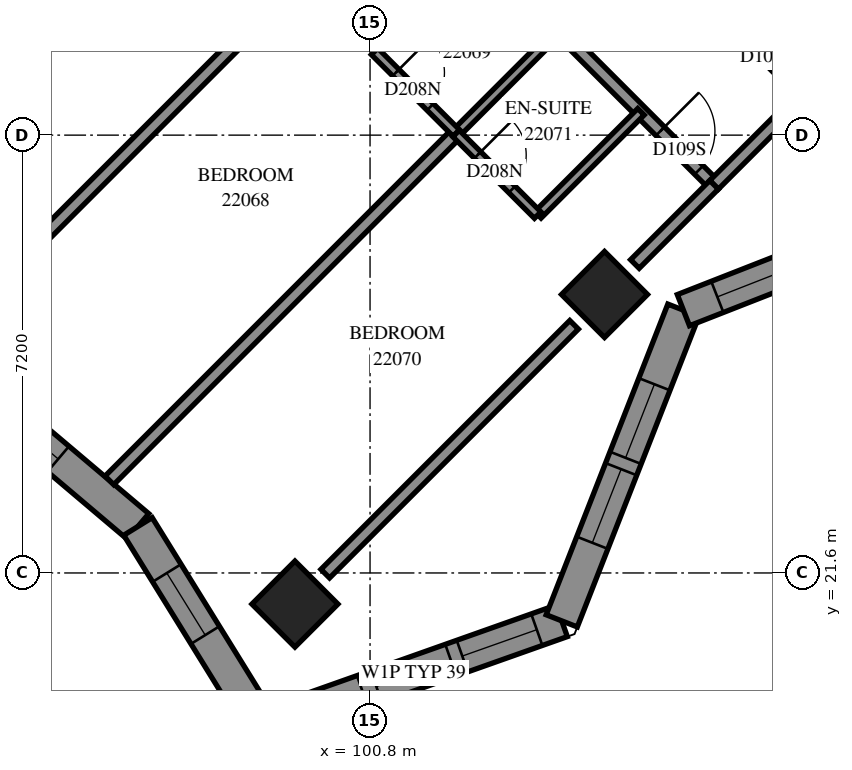
"""IFC4 building model, lengths in metres.
Left out: names, types, materials, properties, quantities, classifications, styles, units other than length and angle.
Written with IfcOpenShell. Run it as: python <this file> out.ifc"""

import sys

from ifc_helpers import new_model, si_unit, direction, frame, frame_2d, origin, origin_2d, place, context, subcontext, project, spatial, polyline, rectangle, outline, extrude, element, fill, save


model = new_model("IFC4")
c1 = context("Model", 3, precision=1e-05, world=origin(), true_north=direction((0.0, 1.0)))
c2 = subcontext(c1, "Body", "Model", "MODEL_VIEW")
j1 = project(units=[si_unit("LENGTHUNIT", "METRE"), si_unit("PLANEANGLEUNIT", "RADIAN")], contexts=[c1])
p1 = place(None, origin())
s1 = spatial("IfcSite", under=j1, at=p1, CompositionType="ELEMENT")
p2 = place(p1, origin())
s2 = spatial("IfcBuilding", under=s1, at=p2, CompositionType="ELEMENT")
p3 = place(p2, frame((0.0, 0.0, 84.6)))
s3 = spatial("IfcBuildingStorey", under=s2, at=p3, CompositionType="ELEMENT", Elevation=84.6)
for number, where, z_axis, x_axis in (
    (1, (104.656, 26.18, 0.0), (0.0, 0.0, 1.0), (0.707, -0.707, 0.0)),
    (2, (99.565, 21.088, 0.0), (0.0, 0.0, 1.0), (0.707, -0.707, 0.0)),
):
    element("IfcColumn", number, at=place(p3, frame(where, z_axis=z_axis, x_axis=x_axis)), inside=s3, PredefinedType="COLUMN", context=c2, shape_type="SweptSolid", body=[
        extrude(rectangle(XDim=1.0, YDim=1.0, at=origin_2d()), origin(), (0.0, 0.0, 1.0), 3.1),
    ])
p4 = place(p3, frame((99.024, 19.067, 0.0), z_axis=(0.0, 0.0, 1.0), x_axis=(0.9426193246, 0.3338694489, 0.0)))
e3 = element("IfcWall", 3, at=p4, inside=s3, PredefinedType="SOLIDWALL", context=c2, shape_type="SweptSolid", body=[
    extrude(outline(polyline([(-0.222, -0.275), (5.354, -0.275), (5.103, 0.275), (0.222, 0.275), (-0.222, -0.275)])), origin(), (0.0, 0.0, 1.0), 3.1),
])
p5 = place(p4, frame((1.993, 0.0, 0.5)))
e4 = element("IfcOpeningElement", 4, at=p5, cuts=e3, PredefinedType="OPENING", context=c2, shape_type="SweptSolid", body=[
    extrude(rectangle(XDim=1.3, YDim=2.45, at=frame_2d((0.65, 1.225))), frame((0.0, 0.285, 0.0), z_axis=(0.0, -1.0, 0.0), x_axis=(1.0, 0.0, 0.0)), (0.0, 0.0, 1.0), 0.57),
])
p6 = place(p4, frame((3.493, 0.0, 0.5)))
e5 = element("IfcOpeningElement", 5, at=p6, cuts=e3, PredefinedType="OPENING", context=c2, shape_type="SweptSolid", body=[
    extrude(rectangle(XDim=1.3, YDim=2.45, at=frame_2d((0.65, 1.225))), frame((0.0, 0.285, 0.0), z_axis=(0.0, -1.0, 0.0), x_axis=(1.0, 0.0, 0.0)), (0.0, 0.0, 1.0), 0.57),
])
p7 = place(p4, frame((0.553, 0.0, 0.5)))
e6 = element("IfcOpeningElement", 6, at=p7, cuts=e3, PredefinedType="OPENING", context=c2, shape_type="SweptSolid", body=[
    extrude(rectangle(XDim=1.2, YDim=2.45, at=frame_2d((0.6, 1.225))), frame((0.0, 0.285, 0.0), z_axis=(0.0, -1.0, 0.0), x_axis=(1.0, 0.0, 0.0)), (0.0, 0.0, 1.0), 0.57),
])
p8 = place(p3, frame((103.952, 20.812, 0.0), z_axis=(0.0, 0.0, 1.0), x_axis=(0.3646659578, 0.9311384103, 0.0)))
e7 = element("IfcWall", 7, at=p8, inside=s3, PredefinedType="SOLIDWALL", context=c2, shape_type="SweptSolid", body=[
    extrude(outline(polyline([(-0.126, -0.275), (5.367, -0.275), (5.607, 0.275), (0.126, 0.275), (-0.126, -0.275)])), origin(), (0.0, 0.0, 1.0), 3.1),
])
p9 = place(p8, frame((1.379, 0.0, 0.5)))
e8 = element("IfcOpeningElement", 8, at=p9, cuts=e7, PredefinedType="OPENING", context=c2, shape_type="SweptSolid", body=[
    extrude(rectangle(XDim=1.3, YDim=2.45, at=frame_2d((0.65, 1.225))), frame((0.0, 0.285, 0.0), z_axis=(0.0, -1.0, 0.0), x_axis=(1.0, 0.0, 0.0)), (0.0, 0.0, 1.0), 0.57),
])
p10 = place(p8, frame((2.879, 0.0, 0.5)))
e9 = element("IfcOpeningElement", 9, at=p10, cuts=e7, PredefinedType="OPENING", context=c2, shape_type="SweptSolid", body=[
    extrude(rectangle(XDim=1.3, YDim=2.45, at=frame_2d((0.65, 1.225))), frame((0.0, 0.285, 0.0), z_axis=(0.0, -1.0, 0.0), x_axis=(1.0, 0.0, 0.0)), (0.0, 0.0, 1.0), 0.57),
])
p11 = place(p3, frame((105.953, 25.922, 0.0), z_axis=(0.0, 0.0, 1.0), x_axis=(0.9311384103, 0.3646659578, 0.0)))
e10 = element("IfcWall", 10, at=p11, inside=s3, PredefinedType="SOLIDWALL", context=c2, shape_type="SweptSolid", body=[
    extrude(outline(polyline([(0.12, -0.275), (5.613, -0.275), (5.361, 0.275), (-0.12, 0.275), (0.12, -0.275)])), origin(), (0.0, 0.0, 1.0), 3.1),
])
p12 = place(p11, frame((0.599, 0.0, 0.5)))
e11 = element("IfcOpeningElement", 11, at=p12, cuts=e10, PredefinedType="OPENING", context=c2, shape_type="SweptSolid", body=[
    extrude(rectangle(XDim=1.2, YDim=2.45, at=frame_2d((0.6, 1.225))), frame((0.0, 0.285, 0.0), z_axis=(0.0, -1.0, 0.0), x_axis=(1.0, 0.0, 0.0)), (0.0, 0.0, 1.0), 0.57),
])
p13 = place(p11, frame((3.08, 0.0, 0.5)))
e12 = element("IfcOpeningElement", 12, at=p13, cuts=e10, PredefinedType="OPENING", context=c2, shape_type="SweptSolid", body=[
    extrude(rectangle(XDim=1.2, YDim=2.45, at=frame_2d((0.6, 1.225))), frame((0.0, 0.285, 0.0), z_axis=(0.0, -1.0, 0.0), x_axis=(1.0, 0.0, 0.0)), (0.0, 0.0, 1.0), 0.57),
])
p14 = place(p3, frame((93.942, 24.937, 0.0), z_axis=(0.0, 0.0, 1.0), x_axis=(0.7635272124, -0.6457756545, 0.0)))
e13 = element("IfcWall", 13, at=p14, inside=s3, PredefinedType="SOLIDWALL", context=c2, shape_type="SweptSolid", body=[
    extrude(outline(polyline([(-0.023, -0.275), (3.939, -0.275), (4.027, 0.275), (0.023, 0.275), (-0.023, -0.275)])), origin(), (0.0, 0.0, 1.0), 3.1),
])
p15 = place(p14, frame((1.065, 0.0, 0.5)))
e14 = element("IfcOpeningElement", 14, at=p15, cuts=e13, PredefinedType="OPENING", context=c2, shape_type="SweptSolid", body=[
    extrude(rectangle(XDim=1.2, YDim=2.45, at=frame_2d((0.6, 1.225))), frame((0.0, 0.285, 0.0), z_axis=(0.0, -1.0, 0.0), x_axis=(1.0, 0.0, 0.0)), (0.0, 0.0, 1.0), 0.57),
])
p16 = place(p3, frame((96.984, 22.365, 0.0), z_axis=(0.0, 0.0, 1.0), x_axis=(0.5261788565, -0.8503739242, 0.0)))
e15 = element("IfcWall", 15, at=p16, inside=s3, PredefinedType="SOLIDWALL", context=c2, shape_type="SweptSolid", body=[
    extrude(outline(polyline([(0.044, -0.275), (4.1, -0.275), (3.657, 0.275), (-0.044, 0.275), (0.044, -0.275)])), origin(), (0.0, 0.0, 1.0), 3.1),
])
p17 = place(p16, frame((0.901, 0.0, 0.5)))
e16 = element("IfcOpeningElement", 16, at=p17, cuts=e15, PredefinedType="OPENING", context=c2, shape_type="SweptSolid", body=[
    extrude(rectangle(XDim=1.2, YDim=2.45, at=frame_2d((0.6, 1.225))), frame((0.0, 0.285, 0.0), z_axis=(0.0, -1.0, 0.0), x_axis=(1.0, 0.0, 0.0)), (0.0, 0.0, 1.0), 0.57),
])
p18 = place(p3, frame((96.513, 23.123, 0.0), z_axis=(0.0, 0.0, 1.0), x_axis=(0.7069766463, 0.7072368922, 0.0)))
e17 = element("IfcWall", 17, at=p18, inside=s3, PredefinedType="PARTITIONING", context=c2, shape_type="SweptSolid", body=[
    extrude(rectangle(XDim=8.069, YDim=0.2, at=frame_2d((4.035, 0.0))), origin(), (0.0, 0.0, 1.0), 3.1),
])
p19 = place(p3, frame((101.365, 33.071, 0.0), z_axis=(0.0, 0.0, 1.0), x_axis=(0.7071067812, -0.7071067812, 0.0)))
e18 = element("IfcWall", 18, at=p19, inside=s3, PredefinedType="PARTITIONING", context=c2, shape_type="SweptSolid", body=[
    extrude(rectangle(XDim=7.2, YDim=0.2, at=frame_2d((3.6, 0.0))), origin(), (0.0, 0.0, 1.0), 3.1),
])
p20 = place(p19, frame((0.248, 0.0, 0.0)))
e19 = element("IfcOpeningElement", 19, at=p20, cuts=e18, PredefinedType="OPENING", context=c2, shape_type="SweptSolid", body=[
    extrude(rectangle(XDim=0.9, YDim=2.1, at=frame_2d((0.45, 1.05))), frame((0.0, 0.11, 0.0), z_axis=(0.0, -1.0, 0.0), x_axis=(1.0, 0.0, 0.0)), (0.0, 0.0, 1.0), 0.22),
])
p21 = place(p19, frame((5.95, 0.0, 0.0)))
e20 = element("IfcOpeningElement", 20, at=p21, cuts=e18, PredefinedType="OPENING", context=c2, shape_type="SweptSolid", body=[
    extrude(rectangle(XDim=0.9, YDim=2.1, at=frame_2d((0.45, 1.05))), frame((0.0, 0.11, 0.0), z_axis=(0.0, -1.0, 0.0), x_axis=(1.0, 0.0, 0.0)), (0.0, 0.0, 1.0), 0.22),
])
p22 = place(p3, frame((100.063, 21.589, 0.0), z_axis=(0.0, 0.0, 1.0), x_axis=(0.7071067812, 0.7071067812, 0.0)))
e21 = element("IfcWall", 21, at=p22, inside=s3, PredefinedType="PARTITIONING", context=c2, shape_type="SweptSolid", body=[
    extrude(rectangle(XDim=5.787, YDim=0.2, at=frame_2d((2.893, 0.0))), origin(), (0.0, 0.0, 1.0), 2.6),
])
p23 = place(p3, frame((94.973, 26.681, 0.0), z_axis=(0.0, 0.0, 1.0), x_axis=(0.7071067812, 0.7071067812, 0.0)))
e22 = element("IfcWall", 22, at=p23, inside=s3, PredefinedType="PARTITIONING", context=c2, shape_type="SweptSolid", body=[
    extrude(rectangle(XDim=5.784, YDim=0.2, at=frame_2d((2.892, 0.0))), origin(), (0.0, 0.0, 1.0), 3.1),
])
p24 = place(p3, frame((104.123, 33.282, 0.0), z_axis=(0.0, 0.0, 1.0), x_axis=(0.7071067812, -0.7071067812, 0.0)))
e23 = element("IfcWall", 23, at=p24, inside=s3, PredefinedType="PARTITIONING", context=c2, shape_type="SweptSolid", body=[
    extrude(rectangle(XDim=5.399, YDim=0.2, at=frame_2d((2.7, 0.0))), origin(), (0.0, 0.0, 1.0), 3.1),
])
p25 = place(p24, frame((4.08, 0.0, 0.0)))
e24 = element("IfcOpeningElement", 24, at=p25, cuts=e23, PredefinedType="OPENING", context=c2, shape_type="SweptSolid", body=[
    extrude(rectangle(XDim=0.9, YDim=2.1, at=frame_2d((0.45, 1.05))), frame((0.0, 0.11, 0.0), z_axis=(0.0, -1.0, 0.0), x_axis=(1.0, 0.0, 0.0)), (0.0, 0.0, 1.0), 0.22),
])
p26 = place(p3, frame((100.871, 30.175, 0.0), z_axis=(0.0, 0.0, 1.0), x_axis=(0.7071067812, 0.7071067812, 0.0)))
e25 = element("IfcWall", 25, at=p26, inside=s3, PredefinedType="PARTITIONING", context=c2, shape_type="SweptSolid", body=[
    extrude(rectangle(XDim=2.401, YDim=0.15, at=frame_2d((1.201, 0.0))), origin(), (0.0, 0.0, 1.0), 3.1),
])
for number, where, z_axis, x_axis in (
    (26, (102.216, 28.832, 0.0), (0.0, 0.0, 1.0), (0.707, 0.707, 0.0)),
    (27, (103.559, 27.489, 0.0), (0.0, 0.0, 1.0), (0.707, 0.707, 0.0)),
):
    element("IfcWall", number, at=place(p3, frame(where, z_axis=z_axis, x_axis=x_axis)), inside=s3, PredefinedType="PARTITIONING", context=c2, shape_type="SweptSolid", body=[
        extrude(rectangle(XDim=2.398, YDim=0.15, at=frame_2d((1.199, 0.0))), origin(), (0.0, 0.0, 1.0), 3.1),
    ])
p27 = place(p3, frame((106.457, 27.983, 0.0), z_axis=(0.0, 0.0, 1.0), x_axis=(0.7071067812, 0.7071067812, 0.0)))
e28 = element("IfcWall", 28, at=p27, inside=s3, PredefinedType="PARTITIONING", context=c2, shape_type="SweptSolid", body=[
    extrude(rectangle(XDim=2.102, YDim=0.2, at=frame_2d((1.051, 0.0))), origin(), (0.0, 0.0, 1.0), 2.6),
])
p28 = place(p3, frame((100.875, 30.177, 0.0), z_axis=(0.0, 0.0, 1.0), x_axis=(0.7076330979, -0.7065800724, 0.0)))
e29 = element("IfcWall", 29, at=p28, inside=s3, PredefinedType="PARTITIONING", context=c2, shape_type="SweptSolid", body=[
    extrude(rectangle(XDim=1.899, YDim=0.15, at=frame_2d((0.95, 0.0))), origin(), (0.0, 0.0, 1.0), 3.1),
])
p29 = place(p28, frame((0.493, 0.0, 0.0)))
e30 = element("IfcOpeningElement", 30, at=p29, cuts=e29, PredefinedType="OPENING", context=c2, shape_type="SweptSolid", body=[
    extrude(rectangle(XDim=0.8, YDim=2.1, at=frame_2d((0.4, 1.05))), frame((0.0, 0.085, 0.0), z_axis=(0.0, -1.0, 0.0), x_axis=(1.0, 0.0, 0.0)), (0.0, 0.0, 1.0), 0.17),
])
p30 = place(p3, frame((102.215, 28.826, 0.0), z_axis=(0.0, 0.0, 1.0), x_axis=(0.7071067812, -0.7071067812, 0.0)))
e31 = element("IfcWall", 31, at=p30, inside=s3, PredefinedType="PARTITIONING", context=c2, shape_type="SweptSolid", body=[
    extrude(rectangle(XDim=1.898, YDim=0.15, at=frame_2d((0.949, 0.0))), origin(), (0.0, 0.0, 1.0), 3.1),
])
p31 = place(p30, frame((0.5, 0.0, 0.0)))
e32 = element("IfcOpeningElement", 32, at=p31, cuts=e31, PredefinedType="OPENING", context=c2, shape_type="SweptSolid", body=[
    extrude(rectangle(XDim=0.8, YDim=2.1, at=frame_2d((0.4, 1.05))), frame((0.0, 0.085, 0.0), z_axis=(0.0, -1.0, 0.0), x_axis=(1.0, 0.0, 0.0)), (0.0, 0.0, 1.0), 0.17),
])
p32 = place(p3, frame((105.155, 26.681, 0.0), z_axis=(0.0, 0.0, 1.0), x_axis=(0.7071067812, 0.7071067812, 0.0)))
e33 = element("IfcWall", 33, at=p32, inside=s3, PredefinedType="PARTITIONING", context=c2, shape_type="SweptSolid", body=[
    extrude(rectangle(XDim=1.841, YDim=0.2, at=frame_2d((0.921, 0.0))), origin(), (0.0, 0.0, 1.0), 2.6),
])
p33 = place(p5, origin())
e34 = element("IfcWindow", 34, at=p33, inside=s3, PartitioningType="SINGLE_PANEL", PredefinedType="WINDOW", context=c2, shape_type="SweptSolid", body=[
    extrude(rectangle(XDim=1.3, YDim=2.45, at=frame_2d((0.65, 1.225))), frame((0.0, 0.155, 0.0), z_axis=(0.0, -1.0, 0.0), x_axis=(1.0, 0.0, 0.0)), (0.0, 0.0, 1.0), 0.06),
])
fill(e4, e34)
p34 = place(p6, origin())
e35 = element("IfcWindow", 35, at=p34, inside=s3, PartitioningType="SINGLE_PANEL", PredefinedType="WINDOW", context=c2, shape_type="SweptSolid", body=[
    extrude(rectangle(XDim=1.3, YDim=2.45, at=frame_2d((0.65, 1.225))), frame((0.0, 0.155, 0.0), z_axis=(0.0, -1.0, 0.0), x_axis=(1.0, 0.0, 0.0)), (0.0, 0.0, 1.0), 0.06),
])
fill(e5, e35)
p35 = place(p7, origin())
e36 = element("IfcWindow", 36, at=p35, inside=s3, PartitioningType="SINGLE_PANEL", PredefinedType="WINDOW", context=c2, shape_type="SweptSolid", body=[
    extrude(rectangle(XDim=1.2, YDim=2.45, at=frame_2d((0.6, 1.225))), frame((0.0, 0.155, 0.0), z_axis=(0.0, -1.0, 0.0), x_axis=(1.0, 0.0, 0.0)), (0.0, 0.0, 1.0), 0.06),
])
fill(e6, e36)
p36 = place(p9, origin())
e37 = element("IfcWindow", 37, at=p36, inside=s3, PartitioningType="SINGLE_PANEL", PredefinedType="WINDOW", context=c2, shape_type="SweptSolid", body=[
    extrude(rectangle(XDim=1.3, YDim=2.45, at=frame_2d((0.65, 1.225))), frame((0.0, 0.155, 0.0), z_axis=(0.0, -1.0, 0.0), x_axis=(1.0, 0.0, 0.0)), (0.0, 0.0, 1.0), 0.06),
])
fill(e8, e37)
p37 = place(p10, origin())
e38 = element("IfcWindow", 38, at=p37, inside=s3, PartitioningType="SINGLE_PANEL", PredefinedType="WINDOW", context=c2, shape_type="SweptSolid", body=[
    extrude(rectangle(XDim=1.3, YDim=2.45, at=frame_2d((0.65, 1.225))), frame((0.0, 0.155, 0.0), z_axis=(0.0, -1.0, 0.0), x_axis=(1.0, 0.0, 0.0)), (0.0, 0.0, 1.0), 0.06),
])
fill(e9, e38)
p38 = place(p12, origin())
e39 = element("IfcWindow", 39, at=p38, inside=s3, PartitioningType="SINGLE_PANEL", PredefinedType="WINDOW", context=c2, shape_type="SweptSolid", body=[
    extrude(rectangle(XDim=1.2, YDim=2.45, at=frame_2d((0.6, 1.225))), frame((0.0, 0.155, 0.0), z_axis=(0.0, -1.0, 0.0), x_axis=(1.0, 0.0, 0.0)), (0.0, 0.0, 1.0), 0.06),
])
fill(e11, e39)
p39 = place(p15, origin())
e40 = element("IfcWindow", 40, at=p39, inside=s3, PartitioningType="SINGLE_PANEL", PredefinedType="WINDOW", context=c2, shape_type="SweptSolid", body=[
    extrude(rectangle(XDim=1.2, YDim=2.45, at=frame_2d((0.6, 1.225))), frame((0.0, 0.155, 0.0), z_axis=(0.0, -1.0, 0.0), x_axis=(1.0, 0.0, 0.0)), (0.0, 0.0, 1.0), 0.06),
])
fill(e14, e40)
p40 = place(p17, origin())
e41 = element("IfcWindow", 41, at=p40, inside=s3, PartitioningType="SINGLE_PANEL", PredefinedType="WINDOW", context=c2, shape_type="SweptSolid", body=[
    extrude(rectangle(XDim=1.2, YDim=2.45, at=frame_2d((0.6, 1.225))), frame((0.0, 0.155, 0.0), z_axis=(0.0, -1.0, 0.0), x_axis=(1.0, 0.0, 0.0)), (0.0, 0.0, 1.0), 0.06),
])
fill(e16, e41)
p41 = place(p29, origin())
e42 = element("IfcDoor", 42, at=p41, inside=s3, OperationType="SINGLE_SWING_RIGHT", PredefinedType="DOOR", context=c2, shape_type="SweptSolid", body=[
    extrude(rectangle(XDim=0.8, YDim=2.1, at=frame_2d((0.4, 1.05))), frame((0.0, 0.025, 0.0), z_axis=(0.0, -1.0, 0.0), x_axis=(1.0, 0.0, 0.0)), (0.0, 0.0, 1.0), 0.05),
])
fill(e30, e42)
p42 = place(p21, origin())
e43 = element("IfcDoor", 43, at=p42, inside=s3, OperationType="SINGLE_SWING_LEFT", PredefinedType="DOOR", context=c2, shape_type="SweptSolid", body=[
    extrude(rectangle(XDim=0.9, YDim=2.1, at=frame_2d((0.45, 1.05))), frame((0.0, 0.025, 0.0), z_axis=(0.0, -1.0, 0.0), x_axis=(1.0, 0.0, 0.0)), (0.0, 0.0, 1.0), 0.05),
])
fill(e20, e43)
p43 = place(p31, origin())
e44 = element("IfcDoor", 44, at=p43, inside=s3, OperationType="SINGLE_SWING_RIGHT", PredefinedType="DOOR", context=c2, shape_type="SweptSolid", body=[
    extrude(rectangle(XDim=0.8, YDim=2.1, at=frame_2d((0.4, 1.05))), frame((0.0, 0.025, 0.0), z_axis=(0.0, -1.0, 0.0), x_axis=(1.0, 0.0, 0.0)), (0.0, 0.0, 1.0), 0.05),
])
fill(e32, e44)
p44 = place(p25, origin())
e45 = element("IfcDoor", 45, at=p44, inside=s3, OperationType="SINGLE_SWING_RIGHT", PredefinedType="DOOR", context=c2, shape_type="SweptSolid", body=[
    extrude(rectangle(XDim=0.9, YDim=2.1, at=frame_2d((0.45, 1.05))), frame((0.0, 0.025, 0.0), z_axis=(0.0, -1.0, 0.0), x_axis=(1.0, 0.0, 0.0)), (0.0, 0.0, 1.0), 0.05),
])
fill(e24, e45)
save(model, sys.argv[1])
